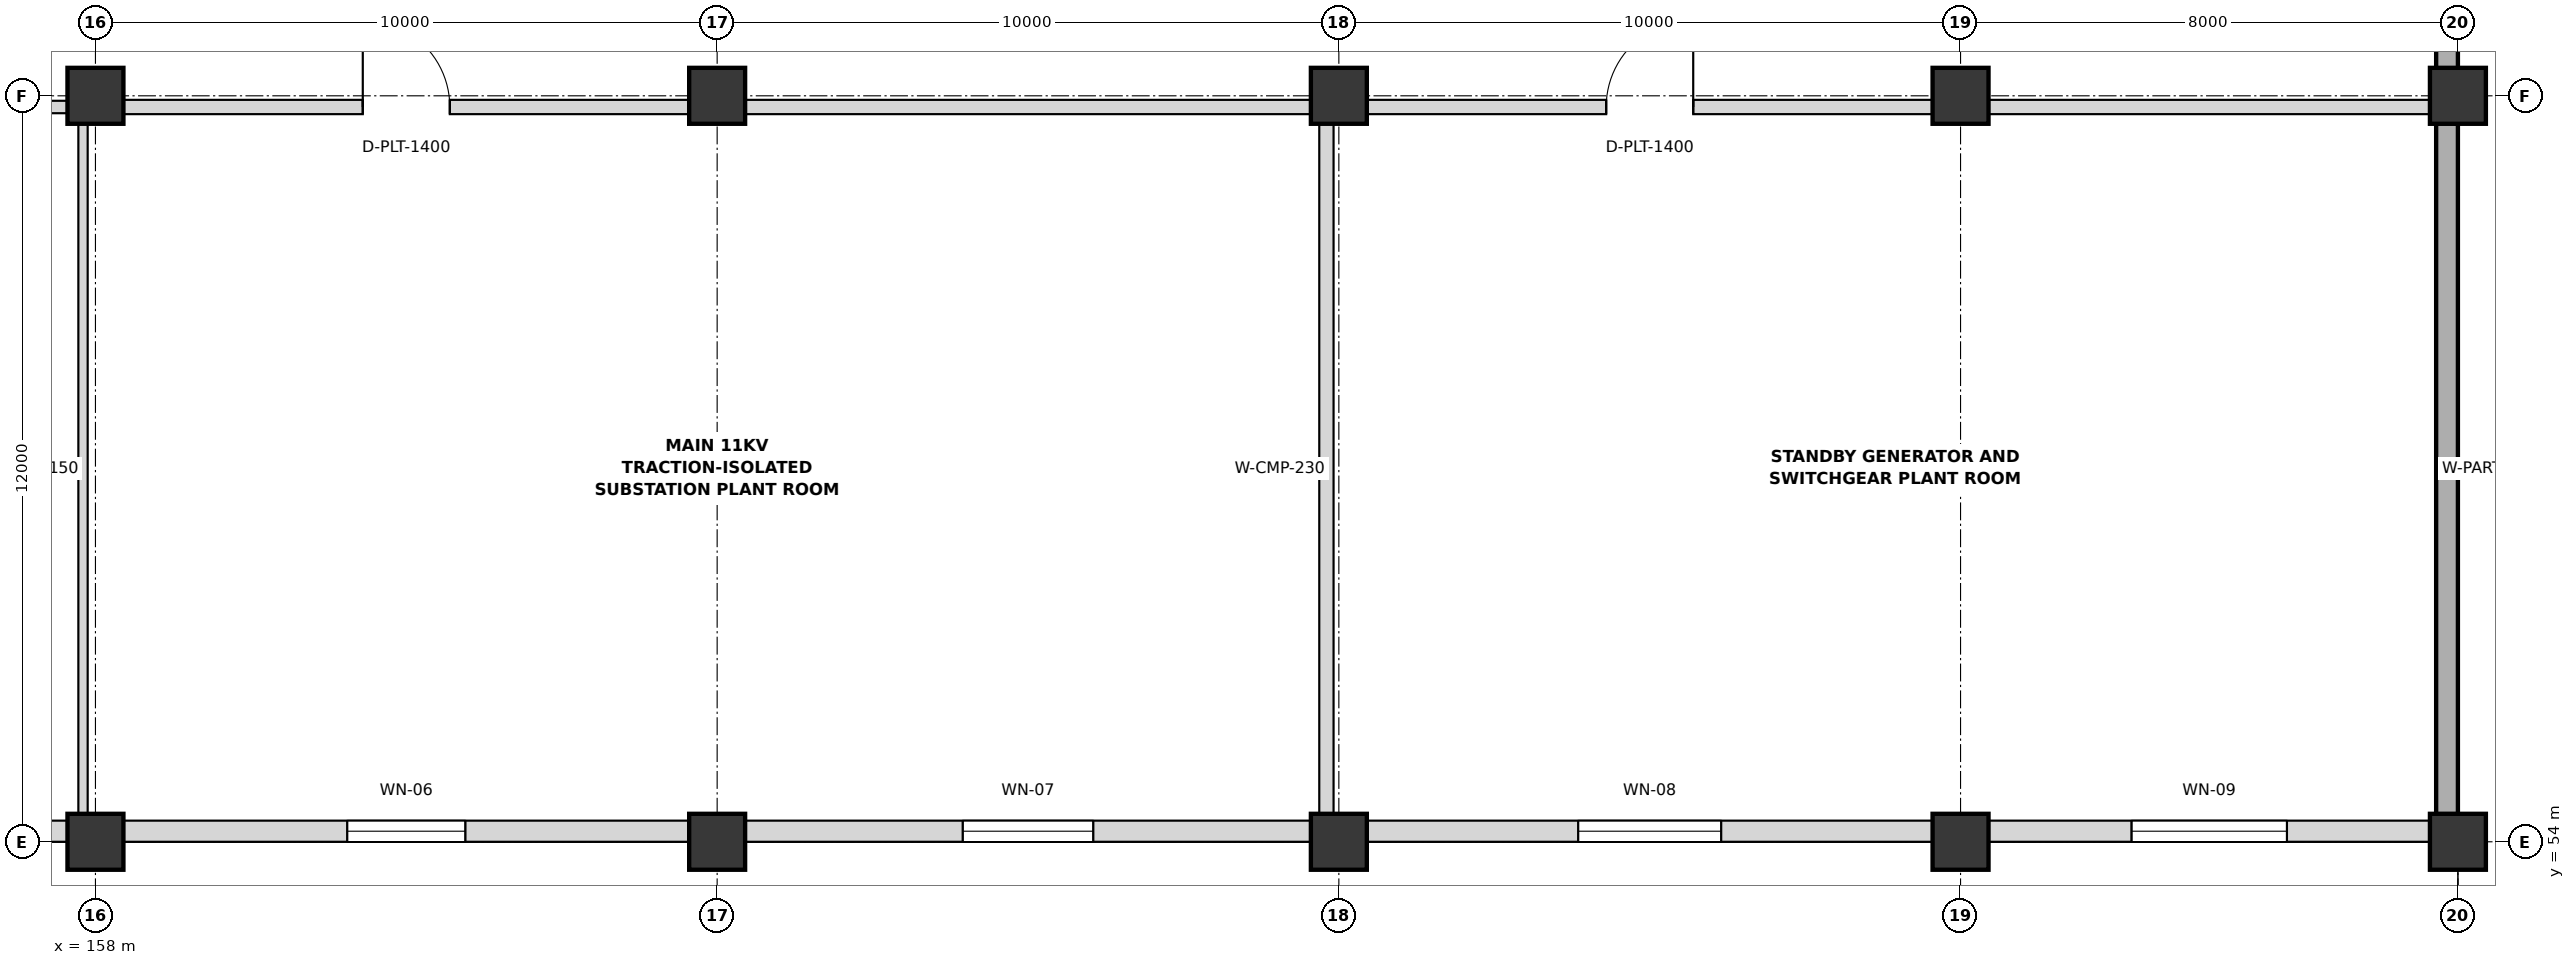
"""IFC4 building model, lengths in metres.
Left out: names, types, materials, properties, quantities, classifications, styles, units other than length and angle.
Written with IfcOpenShell. Run it as: python <this file> out.ifc"""

import sys

from ifc_helpers import new_model, si_unit, direction, frame, frame_2d, origin, origin_2d, place, context, subcontext, project, spatial, rectangle, extrude, element, fill, save


model = new_model("IFC4")
c1 = context("Model", 3, precision=1e-05, world=origin(), true_north=direction((0.0, 1.0)))
c2 = subcontext(c1, "Body", "Model", "MODEL_VIEW")
j1 = project(units=[si_unit("LENGTHUNIT", "METRE"), si_unit("PLANEANGLEUNIT", "RADIAN")], contexts=[c1])
p1 = place(None, origin())
s1 = spatial("IfcSite", under=j1, at=p1, CompositionType="ELEMENT")
p2 = place(p1, origin())
s2 = spatial("IfcBuilding", under=s1, at=p2, CompositionType="ELEMENT")
p3 = place(p2, origin())
s3 = spatial("IfcBuildingStorey", under=s2, at=p3, CompositionType="ELEMENT", Elevation=0.0)
for number, where, z_axis, x_axis in (
    (1, (158.0, 54.0, 0.0), (0.0, 0.0, 1.0), (1.0, 0.0, 0.0)),
    (2, (158.0, 66.0, 0.0), (0.0, 0.0, 1.0), (1.0, 0.0, 0.0)),
    (3, (168.0, 54.0, 0.0), (0.0, 0.0, 1.0), (1.0, 0.0, 0.0)),
    (4, (168.0, 66.0, 0.0), (0.0, 0.0, 1.0), (1.0, 0.0, 0.0)),
    (5, (178.0, 54.0, 0.0), (0.0, 0.0, 1.0), (1.0, 0.0, 0.0)),
    (6, (178.0, 66.0, 0.0), (0.0, 0.0, 1.0), (1.0, 0.0, 0.0)),
    (7, (188.0, 54.0, 0.0), (0.0, 0.0, 1.0), (1.0, 0.0, 0.0)),
    (8, (188.0, 66.0, 0.0), (0.0, 0.0, 1.0), (1.0, 0.0, 0.0)),
    (9, (196.0, 54.0, 0.0), (0.0, 0.0, 1.0), (1.0, 0.0, 0.0)),
    (10, (196.0, 66.0, 0.0), (0.0, 0.0, 1.0), (1.0, 0.0, 0.0)),
):
    element("IfcColumn", number, at=place(p3, frame(where, z_axis=z_axis, x_axis=x_axis)), inside=s3, PredefinedType="COLUMN", context=c2, shape_type="SweptSolid", body=[
        extrude(rectangle(XDim=0.9, YDim=0.9, at=origin_2d()), origin(), (0.0, 0.0, 1.0), 5.4),
    ])
for number, where, z_axis, x_axis in (
    (11, (195.825, 65.555, 0.0), (0.0, 0.0, 1.0), (0.0, -1.0, 0.0)),
    (12, (195.825, 77.555, 0.0), (0.0, 0.0, 1.0), (0.0, -1.0, 0.0)),
):
    element("IfcWall", number, at=place(p3, frame(where, z_axis=z_axis, x_axis=x_axis)), inside=s3, PredefinedType="SOLIDWALL", context=c2, shape_type="SweptSolid", body=[
        extrude(rectangle(XDim=11.11, YDim=0.35, at=frame_2d((5.555, 0.0))), origin(), (0.0, 0.0, 1.0), 5.4),
    ])
p4 = place(p3, frame((157.555, 54.17, 0.0), z_axis=(0.0, 0.0, 1.0), x_axis=(-1.0, 0.0, 0.0)))
e13 = element("IfcWall", 13, at=p4, inside=s3, PredefinedType="SOLIDWALL", context=c2, shape_type="SweptSolid", body=[
    extrude(rectangle(XDim=9.11, YDim=0.34, at=frame_2d((4.555, 0.0))), origin(), (0.0, 0.0, 1.0), 4.358),
])
p5 = place(p4, frame((3.705, 0.0, 1.0)))
e14 = element("IfcOpeningElement", 14, at=p5, cuts=e13, PredefinedType="OPENING", context=c2, shape_type="SweptSolid", body=[
    extrude(rectangle(XDim=1.7, YDim=1.15, at=frame_2d((0.85, 0.575))), frame((0.0, 0.18, 0.0), z_axis=(0.0, -1.0, 0.0), x_axis=(1.0, 0.0, 0.0)), (0.0, 0.0, 1.0), 0.36),
])
p6 = place(p3, frame((167.555, 54.17, 0.0), z_axis=(0.0, 0.0, 1.0), x_axis=(-1.0, 0.0, 0.0)))
e15 = element("IfcWall", 15, at=p6, inside=s3, PredefinedType="SOLIDWALL", context=c2, shape_type="SweptSolid", body=[
    extrude(rectangle(XDim=9.11, YDim=0.34, at=frame_2d((4.555, 0.0))), origin(), (0.0, 0.0, 1.0), 4.358),
])
p7 = place(p6, frame((3.605, 0.0, 1.0)))
e16 = element("IfcOpeningElement", 16, at=p7, cuts=e15, PredefinedType="OPENING", context=c2, shape_type="SweptSolid", body=[
    extrude(rectangle(XDim=1.9, YDim=1.15, at=frame_2d((0.95, 0.575))), frame((0.0, 0.18, 0.0), z_axis=(0.0, -1.0, 0.0), x_axis=(1.0, 0.0, 0.0)), (0.0, 0.0, 1.0), 0.36),
])
p8 = place(p3, frame((177.555, 54.17, 0.0), z_axis=(0.0, 0.0, 1.0), x_axis=(-1.0, 0.0, 0.0)))
e17 = element("IfcWall", 17, at=p8, inside=s3, PredefinedType="SOLIDWALL", context=c2, shape_type="SweptSolid", body=[
    extrude(rectangle(XDim=9.11, YDim=0.34, at=frame_2d((4.555, 0.0))), origin(), (0.0, 0.0, 1.0), 4.358),
])
p9 = place(p8, frame((3.505, 0.0, 1.0)))
e18 = element("IfcOpeningElement", 18, at=p9, cuts=e17, PredefinedType="OPENING", context=c2, shape_type="SweptSolid", body=[
    extrude(rectangle(XDim=2.1, YDim=1.15, at=frame_2d((1.05, 0.575))), frame((0.0, 0.18, 0.0), z_axis=(0.0, -1.0, 0.0), x_axis=(1.0, 0.0, 0.0)), (0.0, 0.0, 1.0), 0.36),
])
p10 = place(p3, frame((187.555, 54.17, 0.0), z_axis=(0.0, 0.0, 1.0), x_axis=(-1.0, 0.0, 0.0)))
e19 = element("IfcWall", 19, at=p10, inside=s3, PredefinedType="SOLIDWALL", context=c2, shape_type="SweptSolid", body=[
    extrude(rectangle(XDim=9.11, YDim=0.34, at=frame_2d((4.555, 0.0))), origin(), (0.0, 0.0, 1.0), 4.358),
])
p11 = place(p10, frame((3.405, 0.0, 1.0)))
e20 = element("IfcOpeningElement", 20, at=p11, cuts=e19, PredefinedType="OPENING", context=c2, shape_type="SweptSolid", body=[
    extrude(rectangle(XDim=2.3, YDim=1.15, at=frame_2d((1.15, 0.575))), frame((0.0, 0.18, 0.0), z_axis=(0.0, -1.0, 0.0), x_axis=(1.0, 0.0, 0.0)), (0.0, 0.0, 1.0), 0.36),
])
p12 = place(p3, frame((195.555, 54.17, 0.0), z_axis=(0.0, 0.0, 1.0), x_axis=(-1.0, 0.0, 0.0)))
e21 = element("IfcWall", 21, at=p12, inside=s3, PredefinedType="SOLIDWALL", context=c2, shape_type="SweptSolid", body=[
    extrude(rectangle(XDim=7.11, YDim=0.34, at=frame_2d((3.555, 0.0))), origin(), (0.0, 0.0, 1.0), 4.358),
])
p13 = place(p12, frame((2.305, 0.0, 1.0)))
e22 = element("IfcOpeningElement", 22, at=p13, cuts=e21, PredefinedType="OPENING", context=c2, shape_type="SweptSolid", body=[
    extrude(rectangle(XDim=2.5, YDim=1.15, at=frame_2d((1.25, 0.575))), frame((0.0, 0.18, 0.0), z_axis=(0.0, -1.0, 0.0), x_axis=(1.0, 0.0, 0.0)), (0.0, 0.0, 1.0), 0.36),
])
p14 = place(p3, frame((128.3, 65.82, 0.0), z_axis=(0.0, 0.0, 1.0), x_axis=(1.0, 0.0, 0.0)))
e23 = element("IfcWall", 23, at=p14, inside=s3, PredefinedType="PARTITIONING", context=c2, shape_type="SweptSolid", body=[
    extrude(rectangle(XDim=29.4, YDim=0.2, at=frame_2d((14.7, 0.0))), origin(), (0.0, 0.0, 1.0), 4.258),
])
p15 = place(p14, frame((13.8, 0.0, 0.0)))
e24 = element("IfcOpeningElement", 24, at=p15, cuts=e23, PredefinedType="OPENING", context=c2, shape_type="SweptSolid", body=[
    extrude(rectangle(XDim=1.8, YDim=2.2, at=frame_2d((0.9, 1.1))), frame((0.0, 0.11, 0.0), z_axis=(0.0, -1.0, 0.0), x_axis=(1.0, 0.0, 0.0)), (0.0, 0.0, 1.0), 0.22),
])
p16 = place(p3, frame((157.8, 54.3, 0.0), z_axis=(0.0, 0.0, 1.0), x_axis=(0.0, 1.0, 0.0)))
e25 = element("IfcWall", 25, at=p16, inside=s3, PredefinedType="PARTITIONING", context=c2, shape_type="SweptSolid", body=[
    extrude(rectangle(XDim=11.4, YDim=0.15, at=frame_2d((5.7, 0.0))), origin(), (0.0, 0.0, 1.0), 4.258),
])
p17 = place(p3, frame((158.3, 65.82, 0.0), z_axis=(0.0, 0.0, 1.0), x_axis=(1.0, 0.0, 0.0)))
e26 = element("IfcWall", 26, at=p17, inside=s3, PredefinedType="PARTITIONING", context=c2, shape_type="SweptSolid", body=[
    extrude(rectangle(XDim=19.4, YDim=0.23, at=frame_2d((9.7, 0.0))), origin(), (0.0, 0.0, 1.0), 4.258),
])
p18 = place(p17, frame((4.0, 0.0, 0.0)))
e27 = element("IfcOpeningElement", 27, at=p18, cuts=e26, PredefinedType="OPENING", context=c2, shape_type="SweptSolid", body=[
    extrude(rectangle(XDim=1.4, YDim=2.2, at=frame_2d((0.7, 1.1))), frame((0.0, 0.125, 0.0), z_axis=(0.0, -1.0, 0.0), x_axis=(1.0, 0.0, 0.0)), (0.0, 0.0, 1.0), 0.25),
])
p19 = place(p3, frame((177.8, 54.3, 0.0), z_axis=(0.0, 0.0, 1.0), x_axis=(0.0, 1.0, 0.0)))
e28 = element("IfcWall", 28, at=p19, inside=s3, PredefinedType="PARTITIONING", context=c2, shape_type="SweptSolid", body=[
    extrude(rectangle(XDim=11.4, YDim=0.23, at=frame_2d((5.7, 0.0))), origin(), (0.0, 0.0, 1.0), 4.258),
])
p20 = place(p3, frame((178.3, 65.82, 0.0), z_axis=(0.0, 0.0, 1.0), x_axis=(1.0, 0.0, 0.0)))
e29 = element("IfcWall", 29, at=p20, inside=s3, PredefinedType="PARTITIONING", context=c2, shape_type="SweptSolid", body=[
    extrude(rectangle(XDim=17.3, YDim=0.23, at=frame_2d((8.65, 0.0))), origin(), (0.0, 0.0, 1.0), 4.258),
])
p21 = place(p20, frame((4.0, 0.0, 0.0)))
e30 = element("IfcOpeningElement", 30, at=p21, cuts=e29, PredefinedType="OPENING", context=c2, shape_type="SweptSolid", body=[
    extrude(rectangle(XDim=1.4, YDim=2.2, at=frame_2d((0.7, 1.1))), frame((0.0, 0.125, 0.0), z_axis=(0.0, -1.0, 0.0), x_axis=(1.0, 0.0, 0.0)), (0.0, 0.0, 1.0), 0.25),
])
p22 = place(p7, origin())
e31 = element("IfcWindow", 31, at=p22, inside=s3, PartitioningType="SINGLE_PANEL", PredefinedType="WINDOW", context=c2, shape_type="SweptSolid", body=[
    extrude(rectangle(XDim=1.9, YDim=1.15, at=frame_2d((0.95, 0.575))), frame((0.0, 0.03, 0.0), z_axis=(0.0, -1.0, 0.0), x_axis=(1.0, 0.0, 0.0)), (0.0, 0.0, 1.0), 0.06),
])
fill(e16, e31)
p23 = place(p9, origin())
e32 = element("IfcWindow", 32, at=p23, inside=s3, PartitioningType="SINGLE_PANEL", PredefinedType="WINDOW", context=c2, shape_type="SweptSolid", body=[
    extrude(rectangle(XDim=2.1, YDim=1.15, at=frame_2d((1.05, 0.575))), frame((0.0, 0.03, 0.0), z_axis=(0.0, -1.0, 0.0), x_axis=(1.0, 0.0, 0.0)), (0.0, 0.0, 1.0), 0.06),
])
fill(e18, e32)
p24 = place(p11, origin())
e33 = element("IfcWindow", 33, at=p24, inside=s3, PartitioningType="SINGLE_PANEL", PredefinedType="WINDOW", context=c2, shape_type="SweptSolid", body=[
    extrude(rectangle(XDim=2.3, YDim=1.15, at=frame_2d((1.15, 0.575))), frame((0.0, 0.03, 0.0), z_axis=(0.0, -1.0, 0.0), x_axis=(1.0, 0.0, 0.0)), (0.0, 0.0, 1.0), 0.06),
])
fill(e20, e33)
p25 = place(p13, origin())
e34 = element("IfcWindow", 34, at=p25, inside=s3, PartitioningType="SINGLE_PANEL", PredefinedType="WINDOW", context=c2, shape_type="SweptSolid", body=[
    extrude(rectangle(XDim=2.5, YDim=1.15, at=frame_2d((1.25, 0.575))), frame((0.0, 0.03, 0.0), z_axis=(0.0, -1.0, 0.0), x_axis=(1.0, 0.0, 0.0)), (0.0, 0.0, 1.0), 0.06),
])
fill(e22, e34)
p26 = place(p18, origin())
e35 = element("IfcDoor", 35, at=p26, inside=s3, OperationType="SINGLE_SWING_LEFT", PredefinedType="DOOR", context=c2, shape_type="SweptSolid", body=[
    extrude(rectangle(XDim=1.4, YDim=2.2, at=frame_2d((0.7, 1.1))), frame((0.0, 0.025, 0.0), z_axis=(0.0, -1.0, 0.0), x_axis=(1.0, 0.0, 0.0)), (0.0, 0.0, 1.0), 0.05),
])
fill(e27, e35)
p27 = place(p21, origin())
e36 = element("IfcDoor", 36, at=p27, inside=s3, OperationType="SINGLE_SWING_RIGHT", PredefinedType="DOOR", context=c2, shape_type="SweptSolid", body=[
    extrude(rectangle(XDim=1.4, YDim=2.2, at=frame_2d((0.7, 1.1))), frame((0.0, 0.025, 0.0), z_axis=(0.0, -1.0, 0.0), x_axis=(1.0, 0.0, 0.0)), (0.0, 0.0, 1.0), 0.05),
])
fill(e30, e36)
save(model, sys.argv[1])
